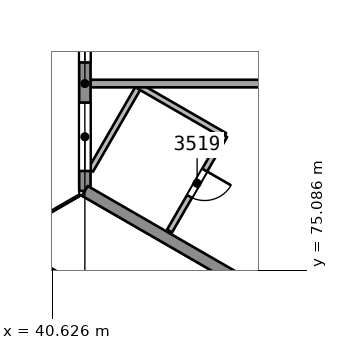
"""IFC4 building model, lengths in metres.
Left out: names, types, materials, properties, quantities, classifications, styles, units other than length and angle.
Written with IfcOpenShell. Run it as: python <this file> out.ifc"""

import sys

from ifc_helpers import new_model, si_unit, direction, frame, frame_2d, origin, place, context, subcontext, project, spatial, rectangle, extrude, element, fill, save


model = new_model("IFC4")
c1 = context("Model", 3, precision=1e-05, world=origin(), true_north=direction((0.0, 1.0)))
c2 = subcontext(c1, "Body", "Model", "MODEL_VIEW")
j1 = project(units=[si_unit("LENGTHUNIT", "METRE"), si_unit("PLANEANGLEUNIT", "RADIAN")], contexts=[c1])
p1 = place(None, origin())
s1 = spatial("IfcSite", under=j1, at=p1, CompositionType="ELEMENT")
p2 = place(p1, origin())
s2 = spatial("IfcBuilding", under=s1, at=p2, CompositionType="ELEMENT")
p3 = place(p2, frame((0.0, 0.0, 143.8)))
s3 = spatial("IfcBuildingStorey", under=s2, at=p3, CompositionType="ELEMENT", Elevation=143.8)
p4 = place(p3, frame((41.637, 80.0, 0.0), z_axis=(0.0, 0.0, 1.0), x_axis=(1.0, 0.0, 0.0)))
e1 = element("IfcWall", 1, at=p4, inside=s3, PredefinedType="PARTITIONING", context=c2, shape_type="SweptSolid", body=[
    extrude(rectangle(XDim=6.561, YDim=0.2, at=frame_2d((3.281, 0.0))), origin(), (0.0, 0.0, 1.0), 3.25),
])
p5 = place(p3, frame((41.637, 77.718, 0.0), z_axis=(0.0, 0.0, 1.0), x_axis=(0.499970471295, 0.866042451519, 0.0)))
e2 = element("IfcWall", 2, at=p5, inside=s3, PredefinedType="PARTITIONING", context=c2, shape_type="SweptSolid", body=[
    extrude(rectangle(XDim=2.556, YDim=0.15, at=frame_2d((1.278, 0.0))), origin(), (0.0, 0.0, 1.0), 3.25),
])
p6 = place(p3, frame((42.915, 79.932, 0.0), z_axis=(0.0, 0.0, 1.0), x_axis=(0.866062058628, -0.499936506574, 0.0)))
e3 = element("IfcWall", 3, at=p6, inside=s3, PredefinedType="PARTITIONING", context=c2, shape_type="SweptSolid", body=[
    extrude(rectangle(XDim=2.6, YDim=0.15, at=frame_2d((1.3, 0.0))), origin(), (0.0, 0.0, 1.0), 3.25),
])
p7 = place(p3, frame((45.167, 78.632, 0.0), z_axis=(0.0, 0.0, 1.0), x_axis=(-0.499987231761, -0.866032775405, 0.0)))
e4 = element("IfcWall", 4, at=p7, inside=s3, PredefinedType="PARTITIONING", context=c2, shape_type="SweptSolid", body=[
    extrude(rectangle(XDim=2.9, YDim=0.15, at=frame_2d((1.45, 0.0))), origin(), (0.0, 0.0, 1.0), 3.25),
])
p8 = place(p7, frame((1.05, 0.0, 0.0)))
e5 = element("IfcOpeningElement", 5, at=p8, cuts=e4, PredefinedType="OPENING", context=c2, shape_type="SweptSolid", body=[
    extrude(rectangle(XDim=0.8, YDim=2.1, at=frame_2d((0.4, 1.05))), frame((0.0, 0.085, 0.0), z_axis=(0.0, -1.0, 0.0), x_axis=(1.0, 0.0, 0.0)), (0.0, 0.0, 1.0), 0.171),
])
p9 = place(p3, frame((41.488, 77.175, 0.0), z_axis=(0.0, 0.0, 1.0), x_axis=(0.0, 1.0, 0.0)))
e6 = element("IfcWall", 6, at=p9, inside=s3, PredefinedType="SOLIDWALL", context=c2, shape_type="SweptSolid", body=[
    extrude(rectangle(XDim=5.65, YDim=0.3, at=frame_2d((2.825, 0.0))), origin(), (0.0, 0.0, 1.0), 3.25),
])
p10 = place(p9, frame((0.524, 0.0, 0.9)))
e7 = element("IfcOpeningElement", 7, at=p10, cuts=e6, PredefinedType="OPENING", context=c2, shape_type="SweptSolid", body=[
    extrude(rectangle(XDim=1.8, YDim=1.5, at=frame_2d((0.9, 0.75))), frame((0.0, 0.161, 0.0), z_axis=(0.0, -1.0, 0.0), x_axis=(1.0, 0.0, 0.0)), (0.0, 0.0, 1.0), 0.321),
])
p11 = place(p9, frame((3.38, 0.0, 0.9)))
e8 = element("IfcOpeningElement", 8, at=p11, cuts=e6, PredefinedType="OPENING", context=c2, shape_type="SweptSolid", body=[
    extrude(rectangle(XDim=1.8, YDim=1.5, at=frame_2d((0.9, 0.75))), frame((0.0, 0.161, 0.0), z_axis=(0.0, -1.0, 0.0), x_axis=(1.0, 0.0, 0.0)), (0.0, 0.0, 1.0), 0.321),
])
p12 = place(p3, frame((89.31, 49.565, 0.0), z_axis=(0.0, 0.0, 1.0), x_axis=(-0.866024712045, 0.500001198125, 0.0)))
e9 = element("IfcWall", 9, at=p12, inside=s3, PredefinedType="SOLIDWALL", context=c2, shape_type="SweptSolid", body=[
    extrude(rectangle(XDim=55.219, YDim=0.3, at=frame_2d((27.61, 0.0))), origin(), (0.0, 0.0, 1.0), 3.25),
])
p13 = place(p12, frame((31.086, 0.0, 0.0)))
e10 = element("IfcOpeningElement", 10, at=p13, cuts=e9, PredefinedType="OPENING", context=c2, shape_type="SweptSolid", body=[
    extrude(rectangle(XDim=2.4, YDim=2.4, at=frame_2d((1.2, 1.2))), frame((0.0, 0.161, 0.0), z_axis=(0.0, -1.0, 0.0), x_axis=(1.0, 0.0, 0.0)), (0.0, 0.0, 1.0), 0.321),
])
p14 = place(p12, frame((42.892, 0.0, 0.0)))
e11 = element("IfcOpeningElement", 11, at=p14, cuts=e9, PredefinedType="OPENING", context=c2, shape_type="SweptSolid", body=[
    extrude(rectangle(XDim=2.4, YDim=2.4, at=frame_2d((1.2, 1.2))), frame((0.0, 0.161, 0.0), z_axis=(0.0, -1.0, 0.0), x_axis=(1.0, 0.0, 0.0)), (0.0, 0.0, 1.0), 0.321),
])
p15 = place(p12, frame((21.421, 0.0, 0.0)))
e12 = element("IfcOpeningElement", 12, at=p15, cuts=e9, PredefinedType="OPENING", context=c2, shape_type="SweptSolid", body=[
    extrude(rectangle(XDim=2.4, YDim=2.4, at=frame_2d((1.2, 1.2))), frame((0.0, 0.161, 0.0), z_axis=(0.0, -1.0, 0.0), x_axis=(1.0, 0.0, 0.0)), (0.0, 0.0, 1.0), 0.321),
])
p16 = place(p12, frame((9.906, 0.0, 0.0)))
e13 = element("IfcOpeningElement", 13, at=p16, cuts=e9, PredefinedType="OPENING", context=c2, shape_type="SweptSolid", body=[
    extrude(rectangle(XDim=2.4, YDim=2.4, at=frame_2d((1.2, 1.2))), frame((0.0, 0.161, 0.0), z_axis=(0.0, -1.0, 0.0), x_axis=(1.0, 0.0, 0.0)), (0.0, 0.0, 1.0), 0.321),
])
p17 = place(p12, frame((26.098, 0.0, 0.0)))
e14 = element("IfcOpeningElement", 14, at=p17, cuts=e9, PredefinedType="OPENING", context=c2, shape_type="SweptSolid", body=[
    extrude(rectangle(XDim=2.4, YDim=2.4, at=frame_2d((1.2, 1.2))), frame((0.0, 0.161, 0.0), z_axis=(0.0, -1.0, 0.0), x_axis=(1.0, 0.0, 0.0)), (0.0, 0.0, 1.0), 0.321),
])
p18 = place(p8, origin())
e15 = element("IfcDoor", 15, at=p18, inside=s3, OperationType="SINGLE_SWING_LEFT", PredefinedType="NOTDEFINED", context=c2, shape_type="SweptSolid", body=[
    extrude(rectangle(XDim=0.8, YDim=2.1, at=frame_2d((0.4, 1.05))), frame((0.0, 0.025, 0.0), z_axis=(0.0, -1.0, 0.0), x_axis=(1.0, 0.0, 0.0)), (0.0, 0.0, 1.0), 0.05),
])
fill(e5, e15)
p19 = place(p10, origin())
e16 = element("IfcWindow", 16, at=p19, inside=s3, PartitioningType="SINGLE_PANEL", PredefinedType="WINDOW", context=c2, shape_type="SweptSolid", body=[
    extrude(rectangle(XDim=1.8, YDim=1.5, at=frame_2d((0.9, 0.75))), frame((0.0, 0.03, 0.0), z_axis=(0.0, -1.0, 0.0), x_axis=(1.0, 0.0, 0.0)), (0.0, 0.0, 1.0), 0.06),
])
fill(e7, e16)
p20 = place(p11, origin())
e17 = element("IfcWindow", 17, at=p20, inside=s3, PartitioningType="SINGLE_PANEL", PredefinedType="WINDOW", context=c2, shape_type="SweptSolid", body=[
    extrude(rectangle(XDim=1.8, YDim=1.5, at=frame_2d((0.9, 0.75))), frame((0.0, 0.03, 0.0), z_axis=(0.0, -1.0, 0.0), x_axis=(1.0, 0.0, 0.0)), (0.0, 0.0, 1.0), 0.06),
])
fill(e8, e17)
save(model, sys.argv[1])
